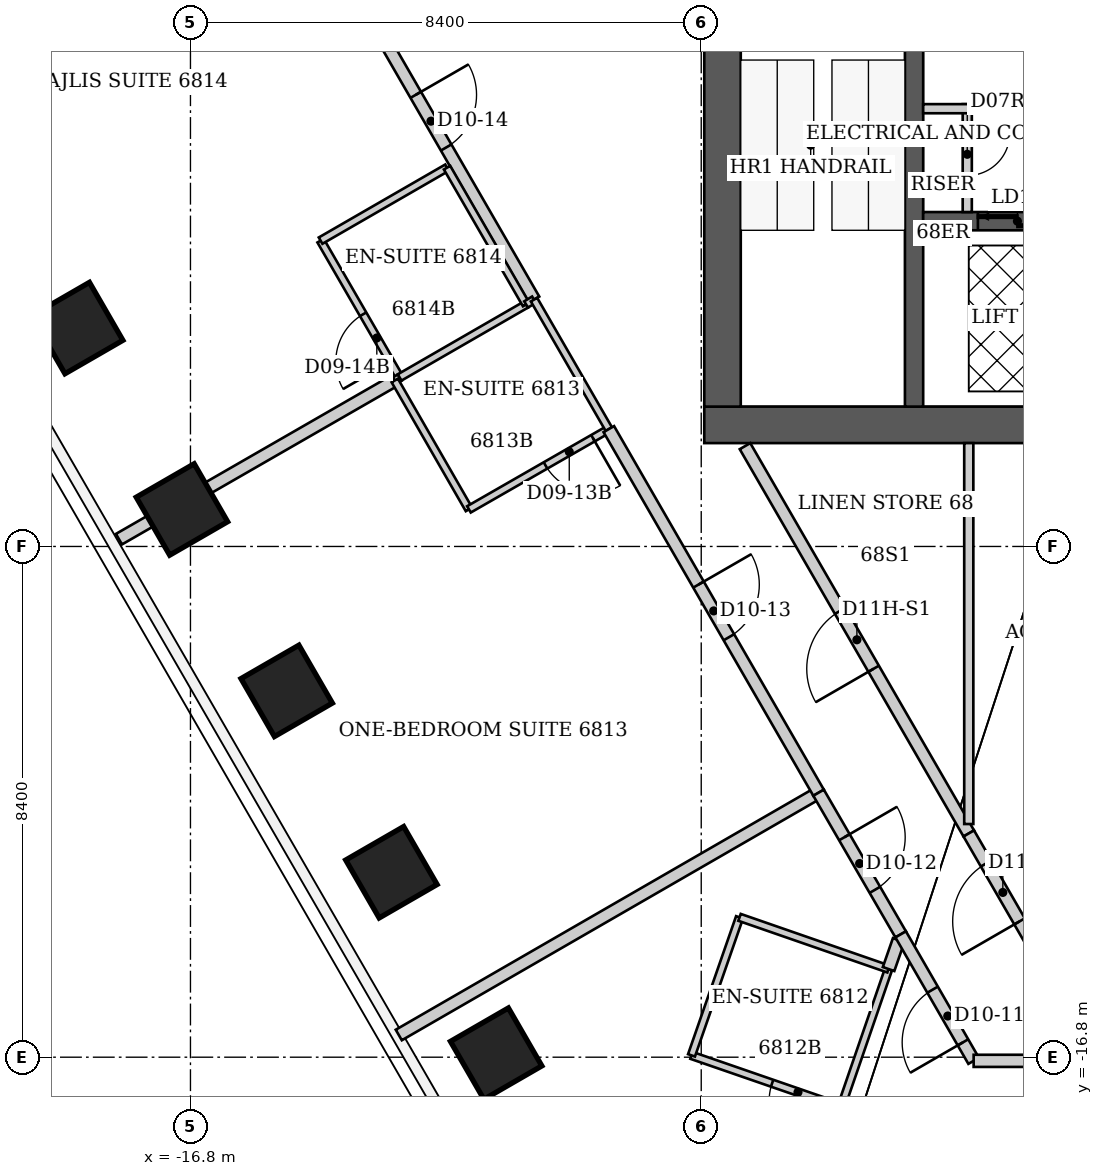
"""IFC4 building model, lengths in metres.
Left out: names, types, materials, properties, quantities, classifications, styles, units other than length and angle.
Written with IfcOpenShell. Run it as: python <this file> out.ifc"""

import sys

from ifc_helpers import new_model, si_unit, direction, frame, frame_2d, origin, origin_2d, place, context, subcontext, project, spatial, rectangle, extrude, element, fill, save


model = new_model("IFC4")
c1 = context("Model", 3, precision=1e-05, world=origin(), true_north=direction((0.0, 1.0)))
c2 = subcontext(c1, "Body", "Model", "MODEL_VIEW")
j1 = project(units=[si_unit("LENGTHUNIT", "METRE"), si_unit("PLANEANGLEUNIT", "RADIAN")], contexts=[c1])
p1 = place(None, origin())
s1 = spatial("IfcSite", under=j1, at=p1, CompositionType="ELEMENT")
p2 = place(p1, origin())
s2 = spatial("IfcBuilding", under=s1, at=p2, CompositionType="ELEMENT")
p3 = place(p2, frame((0.0, 0.0, 272.2)))
s3 = spatial("IfcBuildingStorey", under=s2, at=p3, CompositionType="ELEMENT", Elevation=272.2)
for number, where, z_axis, x_axis in (
    (1, (-11.773, -16.742, 0.0), (0.0, 0.0, 1.0), (-0.866, -0.5, 0.0)),
    (2, (-13.495, -13.759, 0.0), (0.0, 0.0, 1.0), (-0.866, -0.5, 0.0)),
    (3, (-15.218, -10.775, 0.0), (0.0, 0.0, 1.0), (-0.866, -0.5, 0.0)),
    (4, (-16.94, -7.792, 0.0), (0.0, 0.0, 1.0), (-0.866, -0.5, 0.0)),
    (5, (-18.663, -4.808, 0.0), (0.0, 0.0, 1.0), (-0.866, -0.5, 0.0)),
):
    element("IfcColumn", number, at=place(p3, frame(where, z_axis=z_axis, x_axis=x_axis)), inside=s3, PredefinedType="COLUMN", context=c2, shape_type="SweptSolid", body=[
        extrude(rectangle(XDim=1.1, YDim=1.1, at=origin_2d()), origin(), (0.0, 0.0, 1.0), 3.8),
    ])
p4 = place(p3, frame((-8.35, -6.4, 0.0), z_axis=(0.0, 0.0, 1.0), x_axis=(1.0, 0.0, 0.0)))
e6 = element("IfcWall", 6, at=p4, inside=s3, PredefinedType="SHEAR", context=c2, shape_type="SweptSolid", body=[
    extrude(rectangle(XDim=16.7, YDim=0.6, at=frame_2d((8.35, 0.0))), origin(), (0.0, 0.0, 1.0), 3.8),
])
p5 = place(p3, frame((-8.05, -6.1, 0.0), z_axis=(0.0, 0.0, 1.0), x_axis=(0.0, 1.0, 0.0)))
e7 = element("IfcWall", 7, at=p5, inside=s3, PredefinedType="SHEAR", context=c2, shape_type="SweptSolid", body=[
    extrude(rectangle(XDim=12.2, YDim=0.6, at=frame_2d((6.1, 0.0))), origin(), (0.0, 0.0, 1.0), 3.8),
])
p6 = place(p5, frame((7.6, 0.0, 0.0)))
e8 = element("IfcOpeningElement", 8, at=p6, cuts=e7, PredefinedType="OPENING", context=c2, shape_type="SweptSolid", body=[
    extrude(rectangle(XDim=1.2, YDim=2.2, at=frame_2d((0.6, 1.1))), frame((0.0, 0.3, 0.0), z_axis=(0.0, -1.0, 0.0), x_axis=(1.0, 0.0, 0.0)), (0.0, 0.0, 1.0), 0.6),
])
p7 = place(p3, frame((-4.9, -6.1, 0.0), z_axis=(0.0, 0.0, 1.0), x_axis=(0.0, 1.0, 0.0)))
e9 = element("IfcWall", 9, at=p7, inside=s3, PredefinedType="SHEAR", context=c2, shape_type="SweptSolid", body=[
    extrude(rectangle(XDim=7.2, YDim=0.3, at=frame_2d((3.6, 0.0))), origin(), (0.0, 0.0, 1.0), 3.8),
])
p8 = place(p3, frame((-4.75, -3.05, 0.0), z_axis=(0.0, 0.0, 1.0), x_axis=(1.0, 0.0, 0.0)))
e10 = element("IfcWall", 10, at=p8, inside=s3, PredefinedType="SHEAR", context=c2, shape_type="SweptSolid", body=[
    extrude(rectangle(XDim=3.1, YDim=0.3, at=frame_2d((1.55, 0.0))), origin(), (0.0, 0.0, 1.0), 3.8),
])
p9 = place(p8, frame((0.9, 0.0, 0.0)))
e11 = element("IfcOpeningElement", 11, at=p9, cuts=e10, PredefinedType="OPENING", context=c2, shape_type="SweptSolid", body=[
    extrude(rectangle(XDim=1.3, YDim=2.1, at=frame_2d((0.65, 1.05))), frame((0.0, 0.15, 0.0), z_axis=(0.0, -1.0, 0.0), x_axis=(1.0, 0.0, 0.0)), (0.0, 0.0, 1.0), 0.3),
])
p10 = place(p3, frame((-17.976, -8.28, 0.0), z_axis=(0.0, 0.0, 1.0), x_axis=(0.866755072818, 0.498734041092, 0.0)))
e12 = element("IfcWall", 12, at=p10, inside=s3, PredefinedType="PARTITIONING", context=c2, shape_type="SweptSolid", body=[
    extrude(rectangle(XDim=5.233, YDim=0.2, at=frame_2d((2.617, 0.0))), origin(), (0.0, 0.0, 1.0), 3.038),
])
p11 = place(p3, frame((-14.66, -3.37, 0.0), z_axis=(0.0, 0.0, 1.0), x_axis=(0.500291685314, -0.865856933682, 0.0)))
e13 = element("IfcWall", 13, at=p11, inside=s3, PredefinedType="PARTITIONING", context=c2, shape_type="SweptSolid", body=[
    extrude(rectangle(XDim=2.599, YDim=0.12, at=frame_2d((1.299, 0.0))), origin(), (0.0, 0.0, 1.0), 3.64),
])
p12 = place(p11, frame((1.399, 0.0, 0.0)))
e14 = element("IfcOpeningElement", 14, at=p12, cuts=e13, PredefinedType="OPENING", context=c2, shape_type="SweptSolid", body=[
    extrude(rectangle(XDim=0.9, YDim=2.03, at=frame_2d((0.45, 1.015))), frame((0.0, 0.06, 0.0), z_axis=(0.0, -1.0, 0.0), x_axis=(1.0, 0.0, 0.0)), (0.0, 0.0, 1.0), 0.12),
])
p13 = place(p3, frame((-14.54, 1.53, 0.0), z_axis=(0.0, 0.0, 1.0), x_axis=(0.500113178326, -0.865960050386, 0.0)))
e15 = element("IfcWall", 15, at=p13, inside=s3, PredefinedType="PARTITIONING", context=c2, shape_type="SweptSolid", body=[
    extrude(rectangle(XDim=6.779, YDim=0.2, at=frame_2d((3.389, 0.0))), origin(), (0.0, 0.0, 1.0), 3.64),
])
p14 = place(p13, frame((2.889, 0.0, 0.0)))
e16 = element("IfcOpeningElement", 16, at=p14, cuts=e15, PredefinedType="OPENING", context=c2, shape_type="SweptSolid", body=[
    extrude(rectangle(XDim=1.0, YDim=2.13, at=frame_2d((0.5, 1.065))), frame((0.0, 0.1, 0.0), z_axis=(0.0, -1.0, 0.0), x_axis=(1.0, 0.0, 0.0)), (0.0, 0.0, 1.0), 0.2),
])
p15 = place(p3, frame((-13.44, -5.67, 0.0), z_axis=(0.0, 0.0, 1.0), x_axis=(0.865840118177, 0.500320786851, 0.0)))
e17 = element("IfcWall", 17, at=p15, inside=s3, PredefinedType="PARTITIONING", context=c2, shape_type="SweptSolid", body=[
    extrude(rectangle(XDim=0.094, YDim=0.12, at=frame_2d((0.047, 0.0))), origin(), (0.0, 0.0, 1.0), 3.64),
])
p16 = place(p3, frame((-13.44, -5.67, 0.0), z_axis=(0.0, 0.0, 1.0), x_axis=(0.498748634132, -0.866746675766, 0.0)))
e18 = element("IfcWall", 18, at=p16, inside=s3, PredefinedType="PARTITIONING", context=c2, shape_type="SweptSolid", body=[
    extrude(rectangle(XDim=2.446, YDim=0.12, at=frame_2d((1.223, 0.0))), origin(), (0.0, 0.0, 1.0), 3.64),
])
p17 = place(p3, frame((-13.374, -16.435, 0.0), z_axis=(0.0, 0.0, 1.0), x_axis=(0.866082379937, 0.499901301422, 0.0)))
e19 = element("IfcWall", 19, at=p17, inside=s3, PredefinedType="PARTITIONING", context=c2, shape_type="SweptSolid", body=[
    extrude(rectangle(XDim=7.957, YDim=0.2, at=frame_2d((3.978, 0.0))), origin(), (0.0, 0.0, 1.0), 3.64),
])
for number, where, z_axis, x_axis in (
    (20, (-13.36, -5.62, 0.0), (0.0, 0.0, 1.0), (0.866, 0.5, 0.0)),
    (21, (-12.58, -2.17, 0.0), (0.0, 0.0, 1.0), (-0.866, -0.5, 0.0)),
):
    element("IfcWall", number, at=place(p3, frame(where, z_axis=z_axis, x_axis=x_axis)), inside=s3, PredefinedType="PARTITIONING", context=c2, shape_type="SweptSolid", body=[
        extrude(rectangle(XDim=2.401, YDim=0.12, at=frame_2d((1.201, 0.0))), origin(), (0.0, 0.0, 1.0), 3.64),
    ])
p18 = place(p3, frame((-12.22, -7.79, 0.0), z_axis=(0.0, 0.0, 1.0), x_axis=(0.867306827682, 0.497773911185, 0.0)))
e22 = element("IfcWall", 22, at=p18, inside=s3, PredefinedType="PARTITIONING", context=c2, shape_type="SweptSolid", body=[
    extrude(rectangle(XDim=2.652, YDim=0.12, at=frame_2d((1.326, 0.0))), origin(), (0.0, 0.0, 1.0), 3.64),
])
p19 = place(p18, frame((1.452, 0.0, 0.0)))
e23 = element("IfcOpeningElement", 23, at=p19, cuts=e22, PredefinedType="OPENING", context=c2, shape_type="SweptSolid", body=[
    extrude(rectangle(XDim=0.9, YDim=2.03, at=frame_2d((0.45, 1.015))), frame((0.0, 0.06, 0.0), z_axis=(0.0, -1.0, 0.0), x_axis=(1.0, 0.0, 0.0)), (0.0, 0.0, 1.0), 0.12),
])
p20 = place(p3, frame((-11.28, -4.42, 0.0), z_axis=(0.0, 0.0, 1.0), x_axis=(-0.500291685314, 0.865856933682, 0.0)))
e24 = element("IfcWall", 24, at=p20, inside=s3, PredefinedType="PARTITIONING", context=c2, shape_type="SweptSolid", body=[
    extrude(rectangle(XDim=2.599, YDim=0.12, at=frame_2d((1.299, 0.0))), origin(), (0.0, 0.0, 1.0), 3.64),
])
p21 = place(p3, frame((-11.28, -4.42, 0.0), z_axis=(0.0, 0.0, 1.0), x_axis=(0.851933114221, 0.5236506172, 0.0)))
e25 = element("IfcWall", 25, at=p21, inside=s3, PredefinedType="PARTITIONING", context=c2, shape_type="SweptSolid", body=[
    extrude(rectangle(XDim=0.152, YDim=0.12, at=frame_2d((0.076, 0.0))), origin(), (0.0, 0.0, 1.0), 3.64),
])
p22 = place(p3, frame((-11.15, -4.34, 0.0), z_axis=(0.0, 0.0, 1.0), x_axis=(0.500089055364, -0.86597398154, 0.0)))
e26 = element("IfcWall", 26, at=p22, inside=s3, PredefinedType="PARTITIONING", context=c2, shape_type="SweptSolid", body=[
    extrude(rectangle(XDim=2.459, YDim=0.12, at=frame_2d((1.23, 0.0))), origin(), (0.0, 0.0, 1.0), 3.64),
])
p23 = place(p3, frame((-9.92, -6.47, 0.0), z_axis=(0.0, 0.0, 1.0), x_axis=(0.499718371597, -0.866187940974, 0.0)))
e27 = element("IfcWall", 27, at=p23, inside=s3, PredefinedType="PARTITIONING", context=c2, shape_type="SweptSolid", body=[
    extrude(rectangle(XDim=6.904, YDim=0.2, at=frame_2d((3.452, 0.0))), origin(), (0.0, 0.0, 1.0), 3.64),
])
p24 = place(p23, frame((2.952, 0.0, 0.0)))
e28 = element("IfcOpeningElement", 28, at=p24, cuts=e27, PredefinedType="OPENING", context=c2, shape_type="SweptSolid", body=[
    extrude(rectangle(XDim=1.0, YDim=2.13, at=frame_2d((0.5, 1.065))), frame((0.0, 0.1, 0.0), z_axis=(0.0, -1.0, 0.0), x_axis=(1.0, 0.0, 0.0)), (0.0, 0.0, 1.0), 0.2),
])
p25 = place(p3, frame((-8.56, -16.77, 0.0), z_axis=(0.0, 0.0, 1.0), x_axis=(0.94515546045, -0.326620813149, 0.0)))
e29 = element("IfcWall", 29, at=p25, inside=s3, PredefinedType="PARTITIONING", context=c2, shape_type="SweptSolid", body=[
    extrude(rectangle(XDim=2.603, YDim=0.12, at=frame_2d((1.301, 0.0))), origin(), (0.0, 0.0, 1.0), 3.64),
])
p26 = place(p25, frame((1.403, 0.0, 0.0)))
e30 = element("IfcOpeningElement", 30, at=p26, cuts=e29, PredefinedType="OPENING", context=c2, shape_type="SweptSolid", body=[
    extrude(rectangle(XDim=0.9, YDim=2.03, at=frame_2d((0.45, 1.015))), frame((0.0, 0.06, 0.0), z_axis=(0.0, -1.0, 0.0), x_axis=(1.0, 0.0, 0.0)), (0.0, 0.0, 1.0), 0.12),
])
p27 = place(p3, frame((-7.77, -14.5, 0.0), z_axis=(0.0, 0.0, 1.0), x_axis=(-0.328693963496, -0.944436487203, 0.0)))
e31 = element("IfcWall", 31, at=p27, inside=s3, PredefinedType="PARTITIONING", context=c2, shape_type="SweptSolid", body=[
    extrude(rectangle(XDim=2.404, YDim=0.12, at=frame_2d((1.202, 0.0))), origin(), (0.0, 0.0, 1.0), 3.64),
])
p28 = place(p3, frame((-6.47, -12.45, 0.0), z_axis=(0.0, 0.0, 1.0), x_axis=(0.501275699481, -0.865287624498, 0.0)))
e32 = element("IfcWall", 32, at=p28, inside=s3, PredefinedType="PARTITIONING", context=c2, shape_type="SweptSolid", body=[
    extrude(rectangle(XDim=2.693, YDim=0.2, at=frame_2d((1.346, 0.0))), origin(), (0.0, 0.0, 1.0), 3.64),
])
p29 = place(p28, frame((0.846, 0.0, 0.0)))
e33 = element("IfcOpeningElement", 33, at=p29, cuts=e32, PredefinedType="OPENING", context=c2, shape_type="SweptSolid", body=[
    extrude(rectangle(XDim=1.0, YDim=2.13, at=frame_2d((0.5, 1.065))), frame((0.0, 0.1, 0.0), z_axis=(0.0, -1.0, 0.0), x_axis=(1.0, 0.0, 0.0)), (0.0, 0.0, 1.0), 0.2),
])
p30 = place(p3, frame((-6.1, -17.62, 0.0), z_axis=(0.0, 0.0, 1.0), x_axis=(0.325457785204, 0.945556571576, 0.0)))
e34 = element("IfcWall", 34, at=p30, inside=s3, PredefinedType="PARTITIONING", context=c2, shape_type="SweptSolid", body=[
    extrude(rectangle(XDim=2.4, YDim=0.12, at=frame_2d((1.2, 0.0))), origin(), (0.0, 0.0, 1.0), 3.64),
])
p31 = place(p3, frame((-5.32, -15.35, 0.0), z_axis=(0.0, 0.0, 1.0), x_axis=(-0.944742926852, 0.327812144624, 0.0)))
e35 = element("IfcWall", 35, at=p31, inside=s3, PredefinedType="PARTITIONING", context=c2, shape_type="SweptSolid", body=[
    extrude(rectangle(XDim=2.593, YDim=0.12, at=frame_2d((1.297, 0.0))), origin(), (0.0, 0.0, 1.0), 3.64),
])
p32 = place(p3, frame((-5.319, -15.35, 0.0), z_axis=(0.0, 0.0, 1.0), x_axis=(0.329422375526, 0.944182661619, 0.0)))
e36 = element("IfcWall", 36, at=p32, inside=s3, PredefinedType="PARTITIONING", context=c2, shape_type="SweptSolid", body=[
    extrude(rectangle(XDim=0.504, YDim=0.2, at=frame_2d((0.252, 0.0))), origin(), (0.0, 0.0, 1.0), 3.64),
])
p33 = place(p3, frame((-5.12, -14.78, 0.0), z_axis=(0.0, 0.0, 1.0), x_axis=(0.499813401482, -0.866133109688, 0.0)))
e37 = element("IfcWall", 37, at=p33, inside=s3, PredefinedType="PARTITIONING", context=c2, shape_type="SweptSolid", body=[
    extrude(rectangle(XDim=2.401, YDim=0.2, at=frame_2d((1.201, 0.0))), origin(), (0.0, 0.0, 1.0), 3.64),
])
p34 = place(p33, frame((1.05, 0.0, 0.0)))
e38 = element("IfcOpeningElement", 38, at=p34, cuts=e37, PredefinedType="OPENING", context=c2, shape_type="SweptSolid", body=[
    extrude(rectangle(XDim=1.0, YDim=2.13, at=frame_2d((0.5, 1.065))), frame((0.0, 0.1, 0.0), z_axis=(0.0, -1.0, 0.0), x_axis=(1.0, 0.0, 0.0)), (0.0, 0.0, 1.0), 0.2),
])
p35 = place(p3, frame((-4.0, -13.12, 0.0), z_axis=(0.0, 0.0, 1.0), x_axis=(-0.500218436225, 0.865899252835, 0.0)))
e39 = element("IfcWall", 39, at=p35, inside=s3, PredefinedType="PARTITIONING", context=c2, shape_type="SweptSolid", body=[
    extrude(rectangle(XDim=7.357, YDim=0.2, at=frame_2d((3.678, 0.0))), origin(), (0.0, 0.0, 1.0), 3.64),
])
p36 = place(p35, frame((3.128, 0.0, 0.0)))
e40 = element("IfcOpeningElement", 40, at=p36, cuts=e39, PredefinedType="OPENING", context=c2, shape_type="SweptSolid", body=[
    extrude(rectangle(XDim=1.1, YDim=2.2, at=frame_2d((0.55, 1.1))), frame((0.0, 0.1, 0.0), z_axis=(0.0, -1.0, 0.0), x_axis=(1.0, 0.0, 0.0)), (0.0, 0.0, 1.0), 0.2),
])
p37 = place(p3, frame((-4.0, -6.7, 0.0), z_axis=(0.0, 0.0, 1.0), x_axis=(0.0, -1.0, 0.0)))
e41 = element("IfcWall", 41, at=p37, inside=s3, PredefinedType="PARTITIONING", context=c2, shape_type="SweptSolid", body=[
    extrude(rectangle(XDim=6.265, YDim=0.15, at=frame_2d((3.133, 0.0))), origin(), (0.0, 0.0, 1.0), 3.64),
])
p38 = place(p3, frame((-3.92, -16.86, 0.0), z_axis=(0.0, 0.0, 1.0), x_axis=(1.0, 0.0, 0.0)))
e42 = element("IfcWall", 42, at=p38, inside=s3, PredefinedType="PARTITIONING", context=c2, shape_type="SweptSolid", body=[
    extrude(rectangle(XDim=3.92, YDim=0.2, at=frame_2d((1.96, 0.0))), origin(), (0.0, 0.0, 1.0), 3.64),
])
p39 = place(p3, frame((-2.88, -15.06, 0.0), z_axis=(0.0, 0.0, 1.0), x_axis=(-0.499983441833, 0.866034963436, 0.0)))
e43 = element("IfcWall", 43, at=p39, inside=s3, PredefinedType="PARTITIONING", context=c2, shape_type="SweptSolid", body=[
    extrude(rectangle(XDim=2.24, YDim=0.2, at=frame_2d((1.12, 0.0))), origin(), (0.0, 0.0, 1.0), 3.64),
])
p40 = place(p39, frame((0.57, 0.0, 0.0)))
e44 = element("IfcOpeningElement", 44, at=p40, cuts=e43, PredefinedType="OPENING", context=c2, shape_type="SweptSolid", body=[
    extrude(rectangle(XDim=1.1, YDim=2.2, at=frame_2d((0.55, 1.1))), frame((0.0, 0.1, 0.0), z_axis=(0.0, -1.0, 0.0), x_axis=(1.0, 0.0, 0.0)), (0.0, 0.0, 1.0), 0.2),
])
p41 = place(p3, frame((-4.025, -2.9, 0.0), z_axis=(0.0, 0.0, 1.0), x_axis=(0.0, 1.0, 0.0)))
e45 = element("IfcWall", 45, at=p41, inside=s3, PredefinedType="PARTITIONING", context=c2, shape_type="SweptSolid", body=[
    extrude(rectangle(XDim=1.775, YDim=0.15, at=frame_2d((0.887, 0.0))), origin(), (0.0, 0.0, 1.0), 3.64),
])
p42 = place(p41, frame((0.6, 0.0, 0.0)))
e46 = element("IfcOpeningElement", 46, at=p42, cuts=e45, PredefinedType="OPENING", context=c2, shape_type="SweptSolid", body=[
    extrude(rectangle(XDim=0.7, YDim=2.1, at=frame_2d((0.35, 1.05))), frame((0.0, 0.075, 0.0), z_axis=(0.0, -1.0, 0.0), x_axis=(1.0, 0.0, 0.0)), (0.0, 0.0, 1.0), 0.15),
])
p43 = place(p3, frame((-4.75, -1.2, 0.0), z_axis=(0.0, 0.0, 1.0), x_axis=(1.0, 0.0, 0.0)))
e47 = element("IfcWall", 47, at=p43, inside=s3, PredefinedType="PARTITIONING", context=c2, shape_type="SweptSolid", body=[
    extrude(rectangle(XDim=0.8, YDim=0.15, at=frame_2d((0.4, 0.0))), origin(), (0.0, 0.0, 1.0), 3.64),
])
p44 = place(p34, origin())
e48 = element("IfcDoor", 48, at=p44, inside=s3, OperationType="SINGLE_SWING_RIGHT", PredefinedType="DOOR", context=c2, shape_type="SweptSolid", body=[
    extrude(rectangle(XDim=1.0, YDim=2.13, at=frame_2d((0.5, 1.065))), frame((0.0, 0.025, 0.0), z_axis=(0.0, -1.0, 0.0), x_axis=(1.0, 0.0, 0.0)), (0.0, 0.0, 1.0), 0.05),
])
fill(e38, e48)
p45 = place(p29, origin())
e49 = element("IfcDoor", 49, at=p45, inside=s3, OperationType="SINGLE_SWING_LEFT", PredefinedType="DOOR", context=c2, shape_type="SweptSolid", body=[
    extrude(rectangle(XDim=1.0, YDim=2.13, at=frame_2d((0.5, 1.065))), frame((0.0, 0.025, 0.0), z_axis=(0.0, -1.0, 0.0), x_axis=(1.0, 0.0, 0.0)), (0.0, 0.0, 1.0), 0.05),
])
fill(e33, e49)
p46 = place(p26, origin())
e50 = element("IfcDoor", 50, at=p46, inside=s3, OperationType="SINGLE_SWING_RIGHT", PredefinedType="DOOR", context=c2, shape_type="SweptSolid", body=[
    extrude(rectangle(XDim=0.9, YDim=2.03, at=frame_2d((0.45, 1.015))), frame((0.0, 0.025, 0.0), z_axis=(0.0, -1.0, 0.0), x_axis=(1.0, 0.0, 0.0)), (0.0, 0.0, 1.0), 0.05),
])
fill(e30, e50)
p47 = place(p24, origin())
e51 = element("IfcDoor", 51, at=p47, inside=s3, OperationType="SINGLE_SWING_LEFT", PredefinedType="DOOR", context=c2, shape_type="SweptSolid", body=[
    extrude(rectangle(XDim=1.0, YDim=2.13, at=frame_2d((0.5, 1.065))), frame((0.0, 0.025, 0.0), z_axis=(0.0, -1.0, 0.0), x_axis=(1.0, 0.0, 0.0)), (0.0, 0.0, 1.0), 0.05),
])
fill(e28, e51)
p48 = place(p19, origin())
e52 = element("IfcDoor", 52, at=p48, inside=s3, OperationType="SINGLE_SWING_RIGHT", PredefinedType="DOOR", context=c2, shape_type="SweptSolid", body=[
    extrude(rectangle(XDim=0.9, YDim=2.03, at=frame_2d((0.45, 1.015))), frame((0.0, 0.025, 0.0), z_axis=(0.0, -1.0, 0.0), x_axis=(1.0, 0.0, 0.0)), (0.0, 0.0, 1.0), 0.05),
])
fill(e23, e52)
p49 = place(p14, origin())
e53 = element("IfcDoor", 53, at=p49, inside=s3, OperationType="SINGLE_SWING_LEFT", PredefinedType="DOOR", context=c2, shape_type="SweptSolid", body=[
    extrude(rectangle(XDim=1.0, YDim=2.13, at=frame_2d((0.5, 1.065))), frame((0.0, 0.025, 0.0), z_axis=(0.0, -1.0, 0.0), x_axis=(1.0, 0.0, 0.0)), (0.0, 0.0, 1.0), 0.05),
])
fill(e16, e53)
p50 = place(p12, origin())
e54 = element("IfcDoor", 54, at=p50, inside=s3, OperationType="SINGLE_SWING_RIGHT", PredefinedType="DOOR", context=c2, shape_type="SweptSolid", body=[
    extrude(rectangle(XDim=0.9, YDim=2.03, at=frame_2d((0.45, 1.015))), frame((0.0, 0.025, 0.0), z_axis=(0.0, -1.0, 0.0), x_axis=(1.0, 0.0, 0.0)), (0.0, 0.0, 1.0), 0.05),
])
fill(e14, e54)
p51 = place(p36, origin())
e55 = element("IfcDoor", 55, at=p51, inside=s3, OperationType="SINGLE_SWING_LEFT", PredefinedType="DOOR", context=c2, shape_type="SweptSolid", body=[
    extrude(rectangle(XDim=1.1, YDim=2.2, at=frame_2d((0.55, 1.1))), frame((0.0, 0.025, 0.0), z_axis=(0.0, -1.0, 0.0), x_axis=(1.0, 0.0, 0.0)), (0.0, 0.0, 1.0), 0.05),
])
fill(e40, e55)
p52 = place(p40, origin())
e56 = element("IfcDoor", 56, at=p52, inside=s3, OperationType="SINGLE_SWING_LEFT", PredefinedType="DOOR", context=c2, shape_type="SweptSolid", body=[
    extrude(rectangle(XDim=1.1, YDim=2.2, at=frame_2d((0.55, 1.1))), frame((0.0, 0.025, 0.0), z_axis=(0.0, -1.0, 0.0), x_axis=(1.0, 0.0, 0.0)), (0.0, 0.0, 1.0), 0.05),
])
fill(e44, e56)
p53 = place(p42, origin())
e57 = element("IfcDoor", 57, at=p53, inside=s3, OperationType="SINGLE_SWING_RIGHT", PredefinedType="DOOR", context=c2, shape_type="SweptSolid", body=[
    extrude(rectangle(XDim=0.7, YDim=2.1, at=frame_2d((0.35, 1.05))), frame((0.0, 0.025, 0.0), z_axis=(0.0, -1.0, 0.0), x_axis=(1.0, 0.0, 0.0)), (0.0, 0.0, 1.0), 0.05),
])
fill(e46, e57)
p54 = place(p9, origin())
e58 = element("IfcDoor", 58, at=p54, inside=s3, OperationType="DOUBLE_DOOR_SLIDING", PredefinedType="DOOR", context=c2, shape_type="SweptSolid", body=[
    extrude(rectangle(XDim=1.3, YDim=2.1, at=frame_2d((0.65, 1.05))), frame((0.0, 0.025, 0.0), z_axis=(0.0, -1.0, 0.0), x_axis=(1.0, 0.0, 0.0)), (0.0, 0.0, 1.0), 0.05),
])
fill(e11, e58)
save(model, sys.argv[1])
